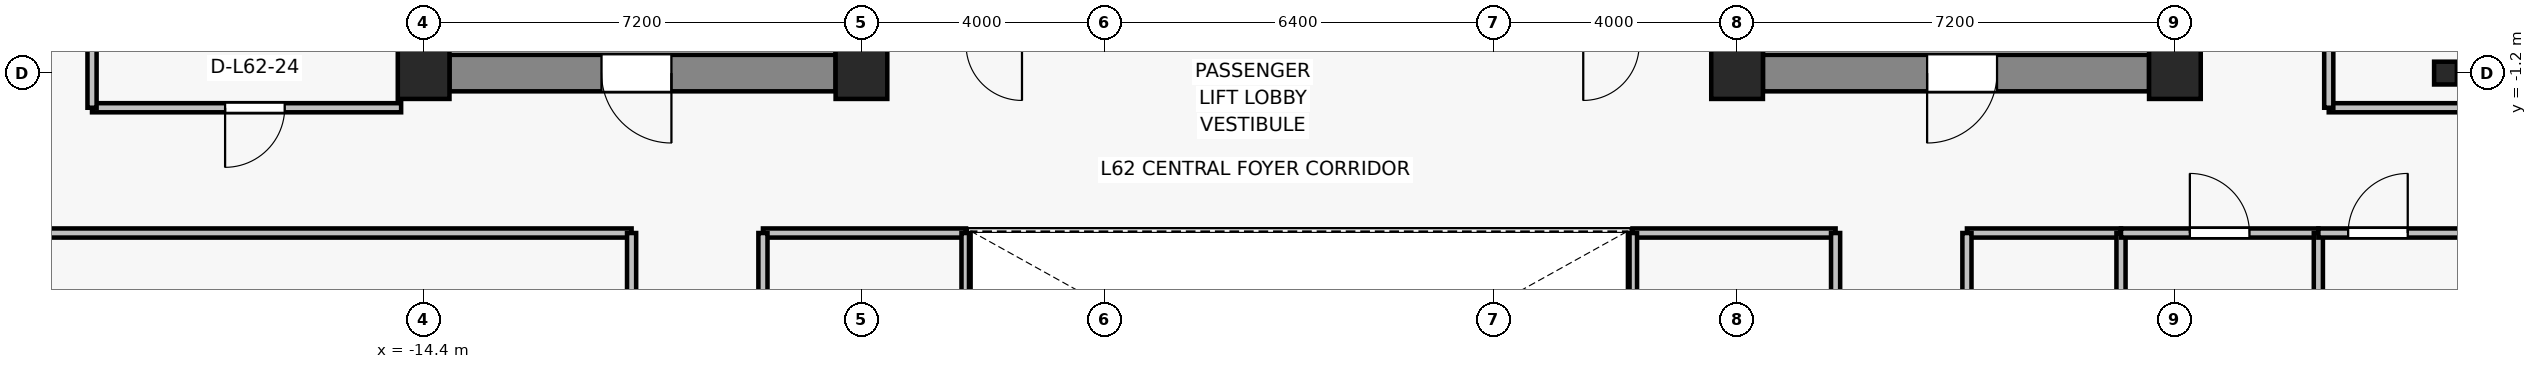
"""IFC4 building model, lengths in metres.
Left out: names, types, materials, properties, quantities, classifications, styles, units other than length and angle.
Written with IfcOpenShell. Run it as: python <this file> out.ifc"""

import sys

from ifc_helpers import new_model, si_unit, direction, frame, frame_2d, origin, origin_2d, place, context, subcontext, project, spatial, rectangle, i_section, extrude, source, transform, mapped, element, fill, save


model = new_model("IFC4")
c1 = context("Model", 3, precision=1e-05, world=origin(), true_north=direction((0.0, 1.0)))
c2 = subcontext(c1, "Body", "Model", "MODEL_VIEW")
j1 = project(units=[si_unit("LENGTHUNIT", "METRE"), si_unit("PLANEANGLEUNIT", "RADIAN")], contexts=[c1])
p1 = place(None, origin())
s1 = spatial("IfcSite", under=j1, at=p1, CompositionType="ELEMENT")
p2 = place(p1, origin())
s2 = spatial("IfcBuilding", under=s1, at=p2, CompositionType="ELEMENT")
p3 = place(p2, frame((0.0, 0.0, 222.1)))
s3 = spatial("IfcBuildingStorey", under=s2, at=p3, CompositionType="ELEMENT", Elevation=222.1)
for number, where, z_axis, x_axis in (
    (1, (-14.4, -1.2, 0.0), (0.0, 0.0, 1.0), (1.0, 0.0, 0.0)),
    (2, (-7.2, -1.2, 0.0), (0.0, 0.0, 1.0), (1.0, 0.0, 0.0)),
    (3, (7.2, -1.2, 0.0), (0.0, 0.0, 1.0), (1.0, 0.0, 0.0)),
    (4, (14.4, -1.2, 0.0), (0.0, 0.0, 1.0), (1.0, 0.0, 0.0)),
):
    element("IfcColumn", number, at=place(p3, frame(where, z_axis=z_axis, x_axis=x_axis)), inside=s3, PredefinedType="COLUMN", context=c2, shape_type="SweptSolid", body=[
        extrude(rectangle(XDim=0.85, YDim=0.85, at=origin_2d()), origin(), (0.0, 0.0, 1.0), 3.3),
    ])
p4 = place(p3, frame((18.85, -1.2, 0.0), z_axis=(0.0, 0.0, 1.0), x_axis=(1.0, 0.0, 0.0)))
e5 = element("IfcColumn", 5, at=p4, inside=s3, PredefinedType="COLUMN", context=c2, shape_type="SweptSolid", body=[
    extrude(i_section(OverallWidth=0.375, OverallDepth=0.375, WebThickness=0.017, FlangeThickness=0.027, FilletRadius=0.015, at=origin_2d()), origin(), (0.0, 0.0, 1.0), 3.3),
])
p5 = place(p3, frame((-7.625, -1.2, 0.0), z_axis=(0.0, 0.0, 1.0), x_axis=(-1.0, 0.0, 0.0)))
e6 = element("IfcWall", 6, at=p5, inside=s3, PredefinedType="SHEAR", context=c2, shape_type="SweptSolid", body=[
    extrude(rectangle(XDim=6.35, YDim=0.6, at=frame_2d((3.175, 0.0))), origin(), (0.0, 0.0, 1.0), 3.075),
])
p6 = place(p5, frame((2.7, 0.0, 0.0)))
e7 = element("IfcOpeningElement", 7, at=p6, cuts=e6, PredefinedType="OPENING", context=c2, shape_type="SweptSolid", body=[
    extrude(rectangle(XDim=1.15, YDim=2.15, at=frame_2d((0.575, 1.075))), frame((0.0, 0.31, 0.0), z_axis=(0.0, -1.0, 0.0), x_axis=(1.0, 0.0, 0.0)), (0.0, 0.0, 1.0), 0.62),
])
p7 = place(p3, frame((13.975, -1.2, 0.0), z_axis=(0.0, 0.0, 1.0), x_axis=(-1.0, 0.0, 0.0)))
e8 = element("IfcWall", 8, at=p7, inside=s3, PredefinedType="SHEAR", context=c2, shape_type="SweptSolid", body=[
    extrude(rectangle(XDim=6.35, YDim=0.6, at=frame_2d((3.175, 0.0))), origin(), (0.0, 0.0, 1.0), 3.075),
])
p8 = place(p7, frame((2.5, 0.0, 0.0)))
e9 = element("IfcOpeningElement", 9, at=p8, cuts=e8, PredefinedType="OPENING", context=c2, shape_type="SweptSolid", body=[
    extrude(rectangle(XDim=1.15, YDim=2.15, at=frame_2d((0.575, 1.075))), frame((0.0, 0.31, 0.0), z_axis=(0.0, -1.0, 0.0), x_axis=(1.0, 0.0, 0.0)), (0.0, 0.0, 1.0), 0.62),
])
for number, where, z_axis, x_axis in (
    (10, (-7.4, -0.9, 0.0), (0.0, 0.0, 1.0), (0.0, 1.0, 0.0)),
    (11, (7.4, -0.9, 0.0), (0.0, 0.0, 1.0), (0.0, 1.0, 0.0)),
):
    element("IfcWall", number, at=place(p3, frame(where, z_axis=z_axis, x_axis=x_axis)), inside=s3, PredefinedType="SHEAR", context=c2, shape_type="SweptSolid", body=[
        extrude(rectangle(XDim=4.15, YDim=0.45, at=frame_2d((2.075, 0.0))), origin(), (0.0, 0.0, 1.0), 3.075),
    ])
p9 = place(p3, frame((-23.53, -3.83, 0.0), z_axis=(0.0, 0.0, 1.0), x_axis=(1.0, 0.0, 0.0)))
e12 = element("IfcWall", 12, at=p9, inside=s3, PredefinedType="PARTITIONING", context=c2, shape_type="SweptSolid", body=[
    extrude(rectangle(XDim=12.55, YDim=0.15, at=frame_2d((6.275, 0.0))), origin(), (0.0, 0.0, 1.0), 2.615),
])
p10 = place(p3, frame((-10.98, -3.83, 0.0), z_axis=(0.0, 0.0, 1.0), x_axis=(0.0, -1.0, 0.0)))
e13 = element("IfcWall", 13, at=p10, inside=s3, PredefinedType="PARTITIONING", context=c2, shape_type="SweptSolid", body=[
    extrude(rectangle(XDim=13.2, YDim=0.15, at=frame_2d((6.6, 0.0))), origin(), (0.0, 0.0, 1.0), 2.615),
])
p11 = place(p10, frame((2.88, 0.0, 0.0)))
e14 = element("IfcOpeningElement", 14, at=p11, cuts=e13, PredefinedType="OPENING", context=c2, shape_type="SweptSolid", body=[
    extrude(rectangle(XDim=0.98, YDim=2.15, at=frame_2d((0.49, 1.075))), frame((0.0, 0.085, 0.0), z_axis=(0.0, -1.0, 0.0), x_axis=(1.0, 0.0, 0.0)), (0.0, 0.0, 1.0), 0.17),
])
p12 = place(p3, frame((10.98, -3.83, 0.0), z_axis=(0.0, 0.0, 1.0), x_axis=(1.0, 0.0, 0.0)))
e15 = element("IfcWall", 15, at=p12, inside=s3, PredefinedType="PARTITIONING", context=c2, shape_type="SweptSolid", body=[
    extrude(rectangle(XDim=2.533, YDim=0.15, at=frame_2d((1.267, 0.0))), origin(), (0.0, 0.0, 1.0), 3.075),
])
p13 = place(p3, frame((10.98, -17.03, 0.0), z_axis=(0.0, 0.0, 1.0), x_axis=(0.0, 1.0, 0.0)))
e16 = element("IfcWall", 16, at=p13, inside=s3, PredefinedType="PARTITIONING", context=c2, shape_type="SweptSolid", body=[
    extrude(rectangle(XDim=13.2, YDim=0.15, at=frame_2d((6.6, 0.0))), origin(), (0.0, 0.0, 1.0), 2.615),
])
p14 = place(p13, frame((9.34, 0.0, 0.0)))
e17 = element("IfcOpeningElement", 17, at=p14, cuts=e16, PredefinedType="OPENING", context=c2, shape_type="SweptSolid", body=[
    extrude(rectangle(XDim=0.98, YDim=2.15, at=frame_2d((0.49, 1.075))), frame((0.0, 0.085, 0.0), z_axis=(0.0, -1.0, 0.0), x_axis=(1.0, 0.0, 0.0)), (0.0, 0.0, 1.0), 0.17),
])
p15 = place(p3, frame((13.513, -3.83, 0.0), z_axis=(0.0, 0.0, 1.0), x_axis=(0.0, -1.0, 0.0)))
e18 = element("IfcWall", 18, at=p15, inside=s3, PredefinedType="PARTITIONING", context=c2, shape_type="SweptSolid", body=[
    extrude(rectangle(XDim=13.2, YDim=0.15, at=frame_2d((6.6, 0.0))), origin(), (0.0, 0.0, 1.0), 2.615),
])
p16 = place(p3, frame((13.513, -3.83, 0.0), z_axis=(0.0, 0.0, 1.0), x_axis=(1.0, 0.0, 0.0)))
e19 = element("IfcWall", 19, at=p16, inside=s3, PredefinedType="PARTITIONING", context=c2, shape_type="SweptSolid", body=[
    extrude(rectangle(XDim=3.246, YDim=0.15, at=frame_2d((1.623, 0.0))), origin(), (0.0, 0.0, 1.0), 2.615),
])
p17 = place(p16, frame((1.133, 0.0, 0.0)))
e20 = element("IfcOpeningElement", 20, at=p17, cuts=e19, PredefinedType="OPENING", context=c2, shape_type="SweptSolid", body=[
    extrude(rectangle(XDim=0.98, YDim=2.15, at=frame_2d((0.49, 1.075))), frame((0.0, 0.085, 0.0), z_axis=(0.0, -1.0, 0.0), x_axis=(1.0, 0.0, 0.0)), (0.0, 0.0, 1.0), 0.17),
])
p18 = place(p3, frame((16.759, -3.83, 0.0), z_axis=(0.0, 0.0, 1.0), x_axis=(0.0, -1.0, 0.0)))
e21 = element("IfcWall", 21, at=p18, inside=s3, PredefinedType="PARTITIONING", context=c2, shape_type="SweptSolid", body=[
    extrude(rectangle(XDim=13.2, YDim=0.15, at=frame_2d((6.6, 0.0))), origin(), (0.0, 0.0, 1.0), 2.615),
])
p19 = place(p3, frame((16.759, -3.83, 0.0), z_axis=(0.0, 0.0, 1.0), x_axis=(1.0, 0.0, 0.0)))
e22 = element("IfcWall", 22, at=p19, inside=s3, PredefinedType="PARTITIONING", context=c2, shape_type="SweptSolid", body=[
    extrude(rectangle(XDim=2.771, YDim=0.15, at=frame_2d((1.385, 0.0))), origin(), (0.0, 0.0, 1.0), 2.765),
])
p20 = place(p19, frame((0.49, 0.0, 0.0)))
e23 = element("IfcOpeningElement", 23, at=p20, cuts=e22, PredefinedType="OPENING", context=c2, shape_type="SweptSolid", body=[
    extrude(rectangle(XDim=0.98, YDim=2.15, at=frame_2d((0.49, 1.075))), frame((0.0, 0.085, 0.0), z_axis=(0.0, -1.0, 0.0), x_axis=(1.0, 0.0, 0.0)), (0.0, 0.0, 1.0), 0.17),
])
p21 = place(p3, frame((-8.82, -3.83, 0.0), z_axis=(0.0, 0.0, 1.0), x_axis=(1.0, 0.0, 0.0)))
e24 = element("IfcWall", 24, at=p21, inside=s3, PredefinedType="PARTITIONING", context=c2, shape_type="SweptSolid", body=[
    extrude(rectangle(XDim=3.34, YDim=0.15, at=frame_2d((1.67, 0.0))), origin(), (0.0, 0.0, 1.0), 2.615),
])
p22 = place(p3, frame((-8.82, -17.03, 0.0), z_axis=(0.0, 0.0, 1.0), x_axis=(0.0, 1.0, 0.0)))
e25 = element("IfcWall", 25, at=p22, inside=s3, PredefinedType="PARTITIONING", context=c2, shape_type="SweptSolid", body=[
    extrude(rectangle(XDim=13.2, YDim=0.15, at=frame_2d((6.6, 0.0))), origin(), (0.0, 0.0, 1.0), 2.615),
])
p23 = place(p22, frame((9.385, 0.0, 0.0)))
e26 = element("IfcOpeningElement", 26, at=p23, cuts=e25, PredefinedType="OPENING", context=c2, shape_type="SweptSolid", body=[
    extrude(rectangle(XDim=0.98, YDim=2.15, at=frame_2d((0.49, 1.075))), frame((0.0, 0.085, 0.0), z_axis=(0.0, -1.0, 0.0), x_axis=(1.0, 0.0, 0.0)), (0.0, 0.0, 1.0), 0.17),
])
p24 = place(p3, frame((-5.48, -3.83, 0.0), z_axis=(0.0, 0.0, 1.0), x_axis=(0.0, -1.0, 0.0)))
e27 = element("IfcWall", 27, at=p24, inside=s3, PredefinedType="PARTITIONING", context=c2, shape_type="SweptSolid", body=[
    extrude(rectangle(XDim=13.2, YDim=0.15, at=frame_2d((6.6, 0.0))), origin(), (0.0, 0.0, 1.0), 2.615),
])
p25 = place(p24, frame((7.22, 0.0, 0.0)))
e28 = element("IfcOpeningElement", 28, at=p25, cuts=e27, PredefinedType="OPENING", context=c2, shape_type="SweptSolid", body=[
    extrude(rectangle(XDim=0.98, YDim=2.15, at=frame_2d((0.49, 1.075))), frame((0.0, 0.085, 0.0), z_axis=(0.0, -1.0, 0.0), x_axis=(1.0, 0.0, 0.0)), (0.0, 0.0, 1.0), 0.17),
])
p26 = place(p3, frame((5.48, -3.83, 0.0), z_axis=(0.0, 0.0, 1.0), x_axis=(1.0, 0.0, 0.0)))
e29 = element("IfcWall", 29, at=p26, inside=s3, PredefinedType="PARTITIONING", context=c2, shape_type="SweptSolid", body=[
    extrude(rectangle(XDim=3.34, YDim=0.15, at=frame_2d((1.67, 0.0))), origin(), (0.0, 0.0, 1.0), 2.615),
])
p27 = place(p3, frame((5.48, -17.03, 0.0), z_axis=(0.0, 0.0, 1.0), x_axis=(0.0, 1.0, 0.0)))
e30 = element("IfcWall", 30, at=p27, inside=s3, PredefinedType="PARTITIONING", context=c2, shape_type="SweptSolid", body=[
    extrude(rectangle(XDim=13.2, YDim=0.15, at=frame_2d((6.6, 0.0))), origin(), (0.0, 0.0, 1.0), 2.615),
])
p28 = place(p3, frame((8.82, -3.83, 0.0), z_axis=(0.0, 0.0, 1.0), x_axis=(0.0, -1.0, 0.0)))
e31 = element("IfcWall", 31, at=p28, inside=s3, PredefinedType="PARTITIONING", context=c2, shape_type="SweptSolid", body=[
    extrude(rectangle(XDim=13.2, YDim=0.15, at=frame_2d((6.6, 0.0))), origin(), (0.0, 0.0, 1.0), 2.615),
])
p29 = place(p28, frame((2.835, 0.0, 0.0)))
e32 = element("IfcOpeningElement", 32, at=p29, cuts=e31, PredefinedType="OPENING", context=c2, shape_type="SweptSolid", body=[
    extrude(rectangle(XDim=0.98, YDim=2.15, at=frame_2d((0.49, 1.075))), frame((0.0, 0.085, 0.0), z_axis=(0.0, -1.0, 0.0), x_axis=(1.0, 0.0, 0.0)), (0.0, 0.0, 1.0), 0.17),
])
p30 = place(p3, frame((-14.77, -1.77, 0.0), z_axis=(0.0, 0.0, 1.0), x_axis=(-1.0, 0.0, 0.0)))
e33 = element("IfcWall", 33, at=p30, inside=s3, PredefinedType="PARTITIONING", context=c2, shape_type="SweptSolid", body=[
    extrude(rectangle(XDim=5.083, YDim=0.15, at=frame_2d((2.542, 0.0))), origin(), (0.0, 0.0, 1.0), 3.075),
])
p31 = place(p30, frame((1.915, 0.0, 0.0)))
e34 = element("IfcOpeningElement", 34, at=p31, cuts=e33, PredefinedType="OPENING", context=c2, shape_type="SweptSolid", body=[
    extrude(rectangle(XDim=0.98, YDim=2.15, at=frame_2d((0.49, 1.075))), frame((0.0, 0.085, 0.0), z_axis=(0.0, -1.0, 0.0), x_axis=(1.0, 0.0, 0.0)), (0.0, 0.0, 1.0), 0.17),
])
p32 = place(p3, frame((-19.853, -1.77, 0.0), z_axis=(0.0, 0.0, 1.0), x_axis=(0.0, 1.0, 0.0)))
e35 = element("IfcWall", 35, at=p32, inside=s3, PredefinedType="PARTITIONING", context=c2, shape_type="SweptSolid", body=[
    extrude(rectangle(XDim=15.65, YDim=0.15, at=frame_2d((7.825, 0.0))), origin(), (0.0, 0.0, 1.0), 2.615),
])
p33 = place(p3, frame((19.53, -1.77, 0.0), z_axis=(0.0, 0.0, 1.0), x_axis=(-1.0, 0.0, 0.0)))
e36 = element("IfcWall", 36, at=p33, inside=s3, PredefinedType="PARTITIONING", context=c2, shape_type="SweptSolid", body=[
    extrude(rectangle(XDim=2.6, YDim=0.15, at=frame_2d((1.3, 0.0))), origin(), (0.0, 0.0, 1.0), 2.765),
])
p34 = place(p3, frame((16.93, -1.77, 0.0), z_axis=(0.0, 0.0, 1.0), x_axis=(0.0, 1.0, 0.0)))
e37 = element("IfcWall", 37, at=p34, inside=s3, PredefinedType="PARTITIONING", context=c2, shape_type="SweptSolid", body=[
    extrude(rectangle(XDim=15.65, YDim=0.15, at=frame_2d((7.825, 0.0))), origin(), (0.0, 0.0, 1.0), 2.615),
])
p35 = place(p34, frame((7.335, 0.0, 0.0)))
e38 = element("IfcOpeningElement", 38, at=p35, cuts=e37, PredefinedType="OPENING", context=c2, shape_type="SweptSolid", body=[
    extrude(rectangle(XDim=0.98, YDim=2.15, at=frame_2d((0.49, 1.075))), frame((0.0, 0.085, 0.0), z_axis=(0.0, -1.0, 0.0), x_axis=(1.0, 0.0, 0.0)), (0.0, 0.0, 1.0), 0.17),
])
m1 = source(origin(), c2, "Body", "SweptSolid", [
    extrude(rectangle(XDim=1.15, YDim=2.15, at=frame_2d((0.575, 1.075))), frame((0.0, 0.025, 0.0), z_axis=(0.0, -1.0, 0.0), x_axis=(1.0, 0.0, 0.0)), (0.0, 0.0, 1.0), 0.05),
])
p36 = place(p6, origin())
e39 = element("IfcDoor", 39, at=p36, inside=s3, OperationType="SINGLE_SWING_LEFT", PredefinedType="DOOR", context=c2, shape_type="MappedRepresentation", body=[
    mapped(m1, transform((0.0, 0.0, 0.0), x_axis=(1.0, 0.0, 0.0), y_axis=(0.0, 1.0, 0.0), z_axis=(0.0, 0.0, 1.0), scale=1.0)),
])
fill(e7, e39)
p37 = place(p8, origin())
e40 = element("IfcDoor", 40, at=p37, inside=s3, OperationType="SINGLE_SWING_RIGHT", PredefinedType="DOOR", context=c2, shape_type="MappedRepresentation", body=[
    mapped(m1, transform((0.0, 0.0, 0.0), x_axis=(1.0, 0.0, 0.0), y_axis=(0.0, 1.0, 0.0), z_axis=(0.0, 0.0, 1.0), scale=1.0)),
])
fill(e9, e40)
m2 = source(origin(), c2, "Body", "SweptSolid", [
    extrude(rectangle(XDim=0.98, YDim=2.15, at=frame_2d((0.49, 1.075))), frame((0.0, 0.025, 0.0), z_axis=(0.0, -1.0, 0.0), x_axis=(1.0, 0.0, 0.0)), (0.0, 0.0, 1.0), 0.05),
])
p38 = place(p17, origin())
e41 = element("IfcDoor", 41, at=p38, inside=s3, OperationType="SINGLE_SWING_LEFT", PredefinedType="DOOR", context=c2, shape_type="MappedRepresentation", body=[
    mapped(m2, transform((0.0, 0.0, 0.0), x_axis=(1.0, 0.0, 0.0), y_axis=(0.0, 1.0, 0.0), z_axis=(0.0, 0.0, 1.0), scale=1.0)),
])
fill(e20, e41)
p39 = place(p20, origin())
e42 = element("IfcDoor", 42, at=p39, inside=s3, OperationType="SINGLE_SWING_RIGHT", PredefinedType="DOOR", context=c2, shape_type="MappedRepresentation", body=[
    mapped(m2, transform((0.0, 0.0, 0.0), x_axis=(1.0, 0.0, 0.0), y_axis=(0.0, 1.0, 0.0), z_axis=(0.0, 0.0, 1.0), scale=1.0)),
])
fill(e23, e42)
p40 = place(p31, origin())
e43 = element("IfcDoor", 43, at=p40, inside=s3, OperationType="SINGLE_SWING_RIGHT", PredefinedType="DOOR", context=c2, shape_type="MappedRepresentation", body=[
    mapped(m2, transform((0.0, 0.0, 0.0), x_axis=(1.0, 0.0, 0.0), y_axis=(0.0, 1.0, 0.0), z_axis=(0.0, 0.0, 1.0), scale=1.0)),
])
fill(e34, e43)
save(model, sys.argv[1])
